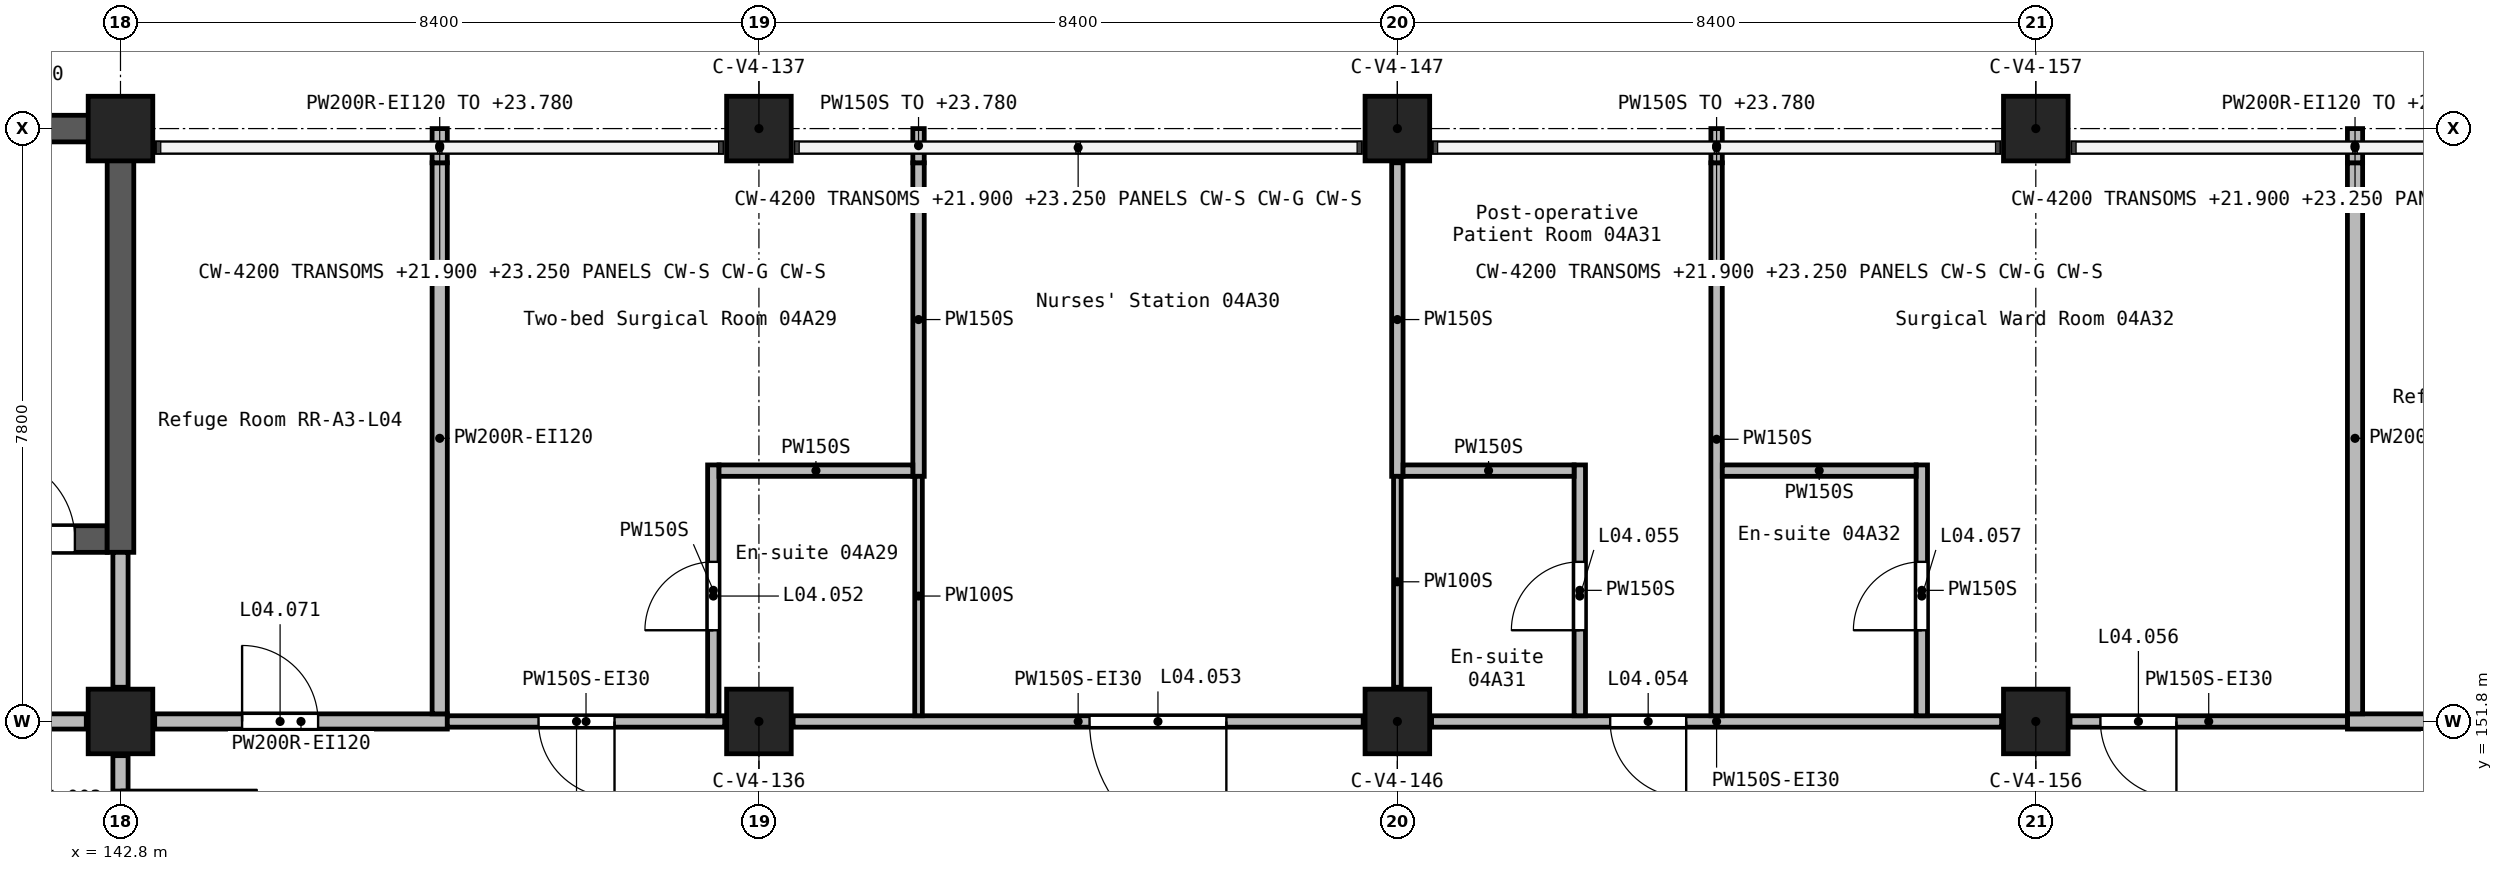
"""IFC4 building model, lengths in metres.
Left out: names, types, materials, properties, quantities, classifications, styles, units other than length and angle.
Written with IfcOpenShell. Run it as: python <this file> out.ifc"""

import sys

from ifc_helpers import new_model, si_unit, direction, frame, frame_2d, origin, origin_2d, place, context, subcontext, project, spatial, rectangle, extrude, element, fill, save


model = new_model("IFC4")
c1 = context("Model", 3, precision=1e-05, world=origin(), true_north=direction((0.0, 1.0)))
c2 = subcontext(c1, "Body", "Model", "MODEL_VIEW")
j1 = project(units=[si_unit("LENGTHUNIT", "METRE"), si_unit("PLANEANGLEUNIT", "RADIAN")], contexts=[c1])
p1 = place(None, origin())
s1 = spatial("IfcSite", under=j1, at=p1, CompositionType="ELEMENT")
p2 = place(p1, origin())
s2 = spatial("IfcBuilding", under=s1, at=p2, CompositionType="ELEMENT")
p3 = place(p2, frame((0.0, 0.0, 21.0)))
s3 = spatial("IfcBuildingStorey", under=s2, at=p3, CompositionType="ELEMENT", Elevation=21.0)
for number, where, z_axis, x_axis in (
    (1, (142.8, 151.8, 0.0), (0.0, 0.0, 1.0), (1.0, 0.0, 0.0)),
    (2, (142.8, 159.6, 0.0), (0.0, 0.0, 1.0), (1.0, 0.0, 0.0)),
    (3, (151.2, 151.8, 0.0), (0.0, 0.0, 1.0), (1.0, 0.0, 0.0)),
    (4, (151.2, 159.6, 0.0), (0.0, 0.0, 1.0), (1.0, 0.0, 0.0)),
    (5, (159.6, 151.8, 0.0), (0.0, 0.0, 1.0), (1.0, 0.0, 0.0)),
    (6, (159.6, 159.6, 0.0), (0.0, 0.0, 1.0), (1.0, 0.0, 0.0)),
    (7, (168.0, 151.8, 0.0), (0.0, 0.0, 1.0), (1.0, 0.0, 0.0)),
    (8, (168.0, 159.6, 0.0), (0.0, 0.0, 1.0), (1.0, 0.0, 0.0)),
):
    element("IfcColumn", number, at=place(p3, frame(where, z_axis=z_axis, x_axis=x_axis)), inside=s3, PredefinedType="COLUMN", context=c2, shape_type="SweptSolid", body=[
        extrude(rectangle(XDim=0.85, YDim=0.85, at=origin_2d()), origin(), (0.0, 0.0, 1.0), 3.9),
    ])
p4 = place(p3, frame((134.225, 159.6, 0.0), z_axis=(0.0, 0.0, 1.0), x_axis=(1.0, 0.0, 0.0)))
e9 = element("IfcWall", 9, at=p4, inside=s3, PredefinedType="SHEAR", context=c2, shape_type="SweptSolid", body=[
    extrude(rectangle(XDim=8.4, YDim=0.35, at=frame_2d((4.2, 0.0))), origin(), (0.0, 0.0, 1.0), 3.9),
])
p5 = place(p3, frame((134.575, 154.2, 0.0), z_axis=(0.0, 0.0, 1.0), x_axis=(1.0, 0.0, 0.0)))
e10 = element("IfcWall", 10, at=p5, inside=s3, PredefinedType="SHEAR", context=c2, shape_type="SweptSolid", body=[
    extrude(rectangle(XDim=8.05, YDim=0.35, at=frame_2d((4.025, 0.0))), origin(), (0.0, 0.0, 1.0), 3.9),
])
p6 = place(p5, frame((6.525, 0.0, 0.0)))
e11 = element("IfcOpeningElement", 11, at=p6, cuts=e10, PredefinedType="OPENING", context=c2, shape_type="SweptSolid", body=[
    extrude(rectangle(XDim=1.1, YDim=2.1, at=frame_2d((0.55, 1.05))), frame((0.0, 0.185, 0.0), z_axis=(0.0, -1.0, 0.0), x_axis=(1.0, 0.0, 0.0)), (0.0, 0.0, 1.0), 0.37),
])
p7 = place(p3, frame((142.8, 154.025, 0.0), z_axis=(0.0, 0.0, 1.0), x_axis=(0.0, 1.0, 0.0)))
e12 = element("IfcWall", 12, at=p7, inside=s3, PredefinedType="SHEAR", context=c2, shape_type="SweptSolid", body=[
    extrude(rectangle(XDim=5.75, YDim=0.35, at=frame_2d((2.875, 0.0))), origin(), (0.0, 0.0, 1.0), 3.9),
])
p8 = place(p3, frame((142.8, 154.025, 0.0), z_axis=(0.0, 0.0, 1.0), x_axis=(0.0, -1.0, 0.0)))
e13 = element("IfcWall", 13, at=p8, inside=s3, PredefinedType="SOLIDWALL", context=c2, shape_type="SweptSolid", body=[
    extrude(rectangle(XDim=1.775, YDim=0.2, at=frame_2d((0.887, 0.0))), origin(), (0.0, 0.0, 1.0), 3.6),
])
p9 = place(p3, frame((142.8, 151.35, 0.0), z_axis=(0.0, 0.0, 1.0), x_axis=(0.0, -1.0, 0.0)))
e14 = element("IfcWall", 14, at=p9, inside=s3, PredefinedType="SOLIDWALL", context=c2, shape_type="SweptSolid", body=[
    extrude(rectangle(XDim=2.7, YDim=0.2, at=frame_2d((1.35, 0.0))), origin(), (0.0, 0.0, 1.0), 3.6),
])
p10 = place(p9, frame((0.45, 0.0, 0.0)))
e15 = element("IfcOpeningElement", 15, at=p10, cuts=e14, PredefinedType="OPENING", context=c2, shape_type="SweptSolid", body=[
    extrude(rectangle(XDim=1.8, YDim=2.1, at=frame_2d((0.9, 1.05))), frame((0.0, 0.11, 0.0), z_axis=(0.0, -1.0, 0.0), x_axis=(1.0, 0.0, 0.0)), (0.0, 0.0, 1.0), 0.22),
])
p11 = place(p3, frame((172.1, 151.8, 0.0), z_axis=(0.0, 0.0, 1.0), x_axis=(1.0, 0.0, 0.0)))
e16 = element("IfcWall", 16, at=p11, inside=s3, PredefinedType="SOLIDWALL", context=c2, shape_type="SweptSolid", body=[
    extrude(rectangle(XDim=3.85, YDim=0.2, at=frame_2d((1.925, 0.0))), origin(), (0.0, 0.0, 1.0), 3.6),
])
p12 = place(p11, frame((1.7, 0.0, 0.0)))
e17 = element("IfcOpeningElement", 17, at=p12, cuts=e16, PredefinedType="OPENING", context=c2, shape_type="SweptSolid", body=[
    extrude(rectangle(XDim=1.0, YDim=2.1, at=frame_2d((0.5, 1.05))), frame((0.0, 0.11, 0.0), z_axis=(0.0, -1.0, 0.0), x_axis=(1.0, 0.0, 0.0)), (0.0, 0.0, 1.0), 0.22),
])
p13 = place(p3, frame((134.85, 151.8, 0.0), z_axis=(0.0, 0.0, 1.0), x_axis=(1.0, 0.0, 0.0)))
e18 = element("IfcWall", 18, at=p13, inside=s3, PredefinedType="SOLIDWALL", context=c2, shape_type="SweptSolid", body=[
    extrude(rectangle(XDim=7.5, YDim=0.2, at=frame_2d((3.75, 0.0))), origin(), (0.0, 0.0, 1.0), 3.6),
])
p14 = place(p13, frame((3.2, 0.0, 0.0)))
e19 = element("IfcOpeningElement", 19, at=p14, cuts=e18, PredefinedType="OPENING", context=c2, shape_type="SweptSolid", body=[
    extrude(rectangle(XDim=1.1, YDim=2.1, at=frame_2d((0.55, 1.05))), frame((0.0, 0.11, 0.0), z_axis=(0.0, -1.0, 0.0), x_axis=(1.0, 0.0, 0.0)), (0.0, 0.0, 1.0), 0.22),
])
p15 = place(p3, frame((143.25, 151.8, 0.0), z_axis=(0.0, 0.0, 1.0), x_axis=(1.0, 0.0, 0.0)))
e20 = element("IfcWall", 20, at=p15, inside=s3, PredefinedType="SOLIDWALL", context=c2, shape_type="SweptSolid", body=[
    extrude(rectangle(XDim=3.85, YDim=0.2, at=frame_2d((1.925, 0.0))), origin(), (0.0, 0.0, 1.0), 3.6),
])
p16 = place(p15, frame((1.15, 0.0, 0.0)))
e21 = element("IfcOpeningElement", 21, at=p16, cuts=e20, PredefinedType="OPENING", context=c2, shape_type="SweptSolid", body=[
    extrude(rectangle(XDim=1.0, YDim=2.1, at=frame_2d((0.5, 1.05))), frame((0.0, 0.11, 0.0), z_axis=(0.0, -1.0, 0.0), x_axis=(1.0, 0.0, 0.0)), (0.0, 0.0, 1.0), 0.22),
])
p17 = place(p3, frame((147.0, 151.9, 0.0), z_axis=(0.0, 0.0, 1.0), x_axis=(0.0, 1.0, 0.0)))
e22 = element("IfcWall", 22, at=p17, inside=s3, PredefinedType="SOLIDWALL", context=c2, shape_type="SweptSolid", body=[
    extrude(rectangle(XDim=7.25, YDim=0.2, at=frame_2d((3.625, 0.0))), origin(), (0.0, 0.0, 1.0), 3.6),
])
p18 = place(p3, frame((147.0, 159.15, 0.0), z_axis=(0.0, 0.0, 1.0), x_axis=(0.0, 1.0, 0.0)))
e23 = element("IfcWall", 23, at=p18, inside=s3, PredefinedType="SOLIDWALL", context=c2, shape_type="SweptSolid", body=[
    extrude(rectangle(XDim=0.45, YDim=0.2, at=frame_2d((0.225, 0.0))), origin(), (0.0, 0.0, 1.0), 2.78),
])
p19 = place(p3, frame((172.2, 151.9, 0.0), z_axis=(0.0, 0.0, 1.0), x_axis=(0.0, 1.0, 0.0)))
e24 = element("IfcWall", 24, at=p19, inside=s3, PredefinedType="SOLIDWALL", context=c2, shape_type="SweptSolid", body=[
    extrude(rectangle(XDim=7.25, YDim=0.2, at=frame_2d((3.625, 0.0))), origin(), (0.0, 0.0, 1.0), 3.6),
])
p20 = place(p3, frame((172.2, 159.15, 0.0), z_axis=(0.0, 0.0, 1.0), x_axis=(0.0, 1.0, 0.0)))
e25 = element("IfcWall", 25, at=p20, inside=s3, PredefinedType="SOLIDWALL", context=c2, shape_type="SweptSolid", body=[
    extrude(rectangle(XDim=0.45, YDim=0.2, at=frame_2d((0.225, 0.0))), origin(), (0.0, 0.0, 1.0), 2.78),
])
p21 = place(p3, frame((172.1, 151.8, 0.0), z_axis=(0.0, 0.0, 1.0), x_axis=(-1.0, 0.0, 0.0)))
e26 = element("IfcWall", 26, at=p21, inside=s3, PredefinedType="PARTITIONING", context=c2, shape_type="SweptSolid", body=[
    extrude(rectangle(XDim=3.65, YDim=0.15, at=frame_2d((1.825, 0.0))), origin(), (0.0, 0.0, 1.0), 3.6),
])
p22 = place(p21, frame((2.25, 0.0, 0.0)))
e27 = element("IfcOpeningElement", 27, at=p22, cuts=e26, PredefinedType="OPENING", context=c2, shape_type="SweptSolid", body=[
    extrude(rectangle(XDim=1.0, YDim=2.1, at=frame_2d((0.5, 1.05))), frame((0.0, 0.085, 0.0), z_axis=(0.0, -1.0, 0.0), x_axis=(1.0, 0.0, 0.0)), (0.0, 0.0, 1.0), 0.17),
])
p23 = place(p3, frame((167.55, 151.8, 0.0), z_axis=(0.0, 0.0, 1.0), x_axis=(-1.0, 0.0, 0.0)))
e28 = element("IfcWall", 28, at=p23, inside=s3, PredefinedType="PARTITIONING", context=c2, shape_type="SweptSolid", body=[
    extrude(rectangle(XDim=7.5, YDim=0.15, at=frame_2d((3.75, 0.0))), origin(), (0.0, 0.0, 1.0), 3.6),
])
p24 = place(p23, frame((4.15, 0.0, 0.0)))
e29 = element("IfcOpeningElement", 29, at=p24, cuts=e28, PredefinedType="OPENING", context=c2, shape_type="SweptSolid", body=[
    extrude(rectangle(XDim=1.0, YDim=2.1, at=frame_2d((0.5, 1.05))), frame((0.0, 0.085, 0.0), z_axis=(0.0, -1.0, 0.0), x_axis=(1.0, 0.0, 0.0)), (0.0, 0.0, 1.0), 0.17),
])
p25 = place(p3, frame((159.15, 151.8, 0.0), z_axis=(0.0, 0.0, 1.0), x_axis=(-1.0, 0.0, 0.0)))
e30 = element("IfcWall", 30, at=p25, inside=s3, PredefinedType="PARTITIONING", context=c2, shape_type="SweptSolid", body=[
    extrude(rectangle(XDim=7.5, YDim=0.15, at=frame_2d((3.75, 0.0))), origin(), (0.0, 0.0, 1.0), 3.6),
])
p26 = place(p25, frame((1.8, 0.0, 0.0)))
e31 = element("IfcOpeningElement", 31, at=p26, cuts=e30, PredefinedType="OPENING", context=c2, shape_type="SweptSolid", body=[
    extrude(rectangle(XDim=1.8, YDim=2.1, at=frame_2d((0.9, 1.05))), frame((0.0, 0.085, 0.0), z_axis=(0.0, -1.0, 0.0), x_axis=(1.0, 0.0, 0.0)), (0.0, 0.0, 1.0), 0.17),
])
p27 = place(p3, frame((150.75, 151.8, 0.0), z_axis=(0.0, 0.0, 1.0), x_axis=(-1.0, 0.0, 0.0)))
e32 = element("IfcWall", 32, at=p27, inside=s3, PredefinedType="PARTITIONING", context=c2, shape_type="SweptSolid", body=[
    extrude(rectangle(XDim=3.65, YDim=0.15, at=frame_2d((1.825, 0.0))), origin(), (0.0, 0.0, 1.0), 3.6),
])
p28 = place(p27, frame((1.45, 0.0, 0.0)))
e33 = element("IfcOpeningElement", 33, at=p28, cuts=e32, PredefinedType="OPENING", context=c2, shape_type="SweptSolid", body=[
    extrude(rectangle(XDim=1.0, YDim=2.1, at=frame_2d((0.5, 1.05))), frame((0.0, 0.085, 0.0), z_axis=(0.0, -1.0, 0.0), x_axis=(1.0, 0.0, 0.0)), (0.0, 0.0, 1.0), 0.17),
])
p29 = place(p3, frame((163.8, 151.875, 0.0), z_axis=(0.0, 0.0, 1.0), x_axis=(0.0, 1.0, 0.0)))
e34 = element("IfcWall", 34, at=p29, inside=s3, PredefinedType="PARTITIONING", context=c2, shape_type="SweptSolid", body=[
    extrude(rectangle(XDim=7.275, YDim=0.15, at=frame_2d((3.637, 0.0))), origin(), (0.0, 0.0, 1.0), 3.6),
])
p30 = place(p3, frame((163.8, 159.15, 0.0), z_axis=(0.0, 0.0, 1.0), x_axis=(0.0, 1.0, 0.0)))
e35 = element("IfcWall", 35, at=p30, inside=s3, PredefinedType="PARTITIONING", context=c2, shape_type="SweptSolid", body=[
    extrude(rectangle(XDim=0.45, YDim=0.15, at=frame_2d((0.225, 0.0))), origin(), (0.0, 0.0, 1.0), 2.78),
])
p31 = place(p3, frame((153.3, 155.025, 0.0), z_axis=(0.0, 0.0, 1.0), x_axis=(0.0, 1.0, 0.0)))
e36 = element("IfcWall", 36, at=p31, inside=s3, PredefinedType="PARTITIONING", context=c2, shape_type="SweptSolid", body=[
    extrude(rectangle(XDim=4.125, YDim=0.15, at=frame_2d((2.062, 0.0))), origin(), (0.0, 0.0, 1.0), 3.6),
])
p32 = place(p3, frame((153.3, 159.15, 0.0), z_axis=(0.0, 0.0, 1.0), x_axis=(0.0, 1.0, 0.0)))
e37 = element("IfcWall", 37, at=p32, inside=s3, PredefinedType="PARTITIONING", context=c2, shape_type="SweptSolid", body=[
    extrude(rectangle(XDim=0.45, YDim=0.15, at=frame_2d((0.225, 0.0))), origin(), (0.0, 0.0, 1.0), 2.78),
])
p33 = place(p3, frame((159.6, 155.025, 0.0), z_axis=(0.0, 0.0, 1.0), x_axis=(0.0, 1.0, 0.0)))
e38 = element("IfcWall", 38, at=p33, inside=s3, PredefinedType="PARTITIONING", context=c2, shape_type="SweptSolid", body=[
    extrude(rectangle(XDim=4.125, YDim=0.15, at=frame_2d((2.062, 0.0))), origin(), (0.0, 0.0, 1.0), 3.6),
])
p34 = place(p3, frame((150.6, 151.875, 0.0), z_axis=(0.0, 0.0, 1.0), x_axis=(0.0, 1.0, 0.0)))
e39 = element("IfcWall", 39, at=p34, inside=s3, PredefinedType="PARTITIONING", context=c2, shape_type="SweptSolid", body=[
    extrude(rectangle(XDim=3.3, YDim=0.15, at=frame_2d((1.65, 0.0))), origin(), (0.0, 0.0, 1.0), 3.6),
])
p35 = place(p34, frame((1.125, 0.0, 0.0)))
e40 = element("IfcOpeningElement", 40, at=p35, cuts=e39, PredefinedType="OPENING", context=c2, shape_type="SweptSolid", body=[
    extrude(rectangle(XDim=0.9, YDim=2.1, at=frame_2d((0.45, 1.05))), frame((0.0, 0.085, 0.0), z_axis=(0.0, -1.0, 0.0), x_axis=(1.0, 0.0, 0.0)), (0.0, 0.0, 1.0), 0.17),
])
p36 = place(p3, frame((162.0, 151.875, 0.0), z_axis=(0.0, 0.0, 1.0), x_axis=(0.0, 1.0, 0.0)))
e41 = element("IfcWall", 41, at=p36, inside=s3, PredefinedType="PARTITIONING", context=c2, shape_type="SweptSolid", body=[
    extrude(rectangle(XDim=3.3, YDim=0.15, at=frame_2d((1.65, 0.0))), origin(), (0.0, 0.0, 1.0), 3.6),
])
p37 = place(p36, frame((1.125, 0.0, 0.0)))
e42 = element("IfcOpeningElement", 42, at=p37, cuts=e41, PredefinedType="OPENING", context=c2, shape_type="SweptSolid", body=[
    extrude(rectangle(XDim=0.9, YDim=2.1, at=frame_2d((0.45, 1.05))), frame((0.0, 0.085, 0.0), z_axis=(0.0, -1.0, 0.0), x_axis=(1.0, 0.0, 0.0)), (0.0, 0.0, 1.0), 0.17),
])
p38 = place(p3, frame((166.5, 151.875, 0.0), z_axis=(0.0, 0.0, 1.0), x_axis=(0.0, 1.0, 0.0)))
e43 = element("IfcWall", 43, at=p38, inside=s3, PredefinedType="PARTITIONING", context=c2, shape_type="SweptSolid", body=[
    extrude(rectangle(XDim=3.3, YDim=0.15, at=frame_2d((1.65, 0.0))), origin(), (0.0, 0.0, 1.0), 3.6),
])
p39 = place(p38, frame((1.125, 0.0, 0.0)))
e44 = element("IfcOpeningElement", 44, at=p39, cuts=e43, PredefinedType="OPENING", context=c2, shape_type="SweptSolid", body=[
    extrude(rectangle(XDim=0.9, YDim=2.1, at=frame_2d((0.45, 1.05))), frame((0.0, 0.085, 0.0), z_axis=(0.0, -1.0, 0.0), x_axis=(1.0, 0.0, 0.0)), (0.0, 0.0, 1.0), 0.17),
])
for number, where, z_axis, x_axis in (
    (45, (150.675, 155.1, 0.0), (0.0, 0.0, 1.0), (1.0, 0.0, 0.0)),
    (46, (163.875, 155.1, 0.0), (0.0, 0.0, 1.0), (1.0, 0.0, 0.0)),
):
    element("IfcWall", number, at=place(p3, frame(where, z_axis=z_axis, x_axis=x_axis)), inside=s3, PredefinedType="PARTITIONING", context=c2, shape_type="SweptSolid", body=[
        extrude(rectangle(XDim=2.55, YDim=0.15, at=frame_2d((1.275, 0.0))), origin(), (0.0, 0.0, 1.0), 3.6),
    ])
p40 = place(p3, frame((159.675, 155.1, 0.0), z_axis=(0.0, 0.0, 1.0), x_axis=(1.0, 0.0, 0.0)))
e47 = element("IfcWall", 47, at=p40, inside=s3, PredefinedType="PARTITIONING", context=c2, shape_type="SweptSolid", body=[
    extrude(rectangle(XDim=2.25, YDim=0.15, at=frame_2d((1.125, 0.0))), origin(), (0.0, 0.0, 1.0), 3.6),
])
p41 = place(p3, frame((153.3, 151.875, 0.0), z_axis=(0.0, 0.0, 1.0), x_axis=(0.0, 1.0, 0.0)))
e48 = element("IfcWall", 48, at=p41, inside=s3, PredefinedType="PARTITIONING", context=c2, shape_type="SweptSolid", body=[
    extrude(rectangle(XDim=3.15, YDim=0.1, at=frame_2d((1.575, 0.0))), origin(), (0.0, 0.0, 1.0), 3.6),
])
p42 = place(p3, frame((159.6, 152.25, 0.0), z_axis=(0.0, 0.0, 1.0), x_axis=(0.0, 1.0, 0.0)))
e49 = element("IfcWall", 49, at=p42, inside=s3, PredefinedType="PARTITIONING", context=c2, shape_type="SweptSolid", body=[
    extrude(rectangle(XDim=2.775, YDim=0.1, at=frame_2d((1.387, 0.0))), origin(), (0.0, 0.0, 1.0), 3.6),
])
p43 = place(p10, origin())
e50 = element("IfcDoor", 50, at=p43, inside=s3, OperationType="DOUBLE_DOOR_SINGLE_SWING", PredefinedType="DOOR", context=c2, shape_type="SweptSolid", body=[
    extrude(rectangle(XDim=1.8, YDim=2.1, at=frame_2d((0.9, 1.05))), frame((0.0, 0.025, 0.0), z_axis=(0.0, -1.0, 0.0), x_axis=(1.0, 0.0, 0.0)), (0.0, 0.0, 1.0), 0.05),
])
fill(e15, e50)
p44 = place(p28, frame((1.0, 0.0, 0.0), z_axis=(0.0, 0.0, 1.0), x_axis=(-1.0, 0.0, 0.0)))
e51 = element("IfcDoor", 51, at=p44, inside=s3, OperationType="SINGLE_SWING_LEFT", PredefinedType="DOOR", context=c2, shape_type="SweptSolid", body=[
    extrude(rectangle(XDim=1.0, YDim=2.1, at=frame_2d((0.5, 1.05))), frame((0.0, 0.025, 0.0), z_axis=(0.0, -1.0, 0.0), x_axis=(1.0, 0.0, 0.0)), (0.0, 0.0, 1.0), 0.05),
])
fill(e33, e51)
p45 = place(p35, frame((0.9, 0.0, 0.0), z_axis=(0.0, 0.0, 1.0), x_axis=(-1.0, 0.0, 0.0)))
e52 = element("IfcDoor", 52, at=p45, inside=s3, OperationType="SINGLE_SWING_RIGHT", PredefinedType="DOOR", context=c2, shape_type="SweptSolid", body=[
    extrude(rectangle(XDim=0.9, YDim=2.1, at=frame_2d((0.45, 1.05))), frame((0.0, 0.025, 0.0), z_axis=(0.0, -1.0, 0.0), x_axis=(1.0, 0.0, 0.0)), (0.0, 0.0, 1.0), 0.05),
])
fill(e40, e52)
p46 = place(p26, frame((1.8, 0.0, 0.0), z_axis=(0.0, 0.0, 1.0), x_axis=(-1.0, 0.0, 0.0)))
e53 = element("IfcDoor", 53, at=p46, inside=s3, OperationType="DOUBLE_DOOR_SINGLE_SWING", PredefinedType="DOOR", context=c2, shape_type="SweptSolid", body=[
    extrude(rectangle(XDim=1.8, YDim=2.1, at=frame_2d((0.9, 1.05))), frame((0.0, 0.025, 0.0), z_axis=(0.0, -1.0, 0.0), x_axis=(1.0, 0.0, 0.0)), (0.0, 0.0, 1.0), 0.05),
])
fill(e31, e53)
p47 = place(p24, frame((1.0, 0.0, 0.0), z_axis=(0.0, 0.0, 1.0), x_axis=(-1.0, 0.0, 0.0)))
e54 = element("IfcDoor", 54, at=p47, inside=s3, OperationType="SINGLE_SWING_LEFT", PredefinedType="DOOR", context=c2, shape_type="SweptSolid", body=[
    extrude(rectangle(XDim=1.0, YDim=2.1, at=frame_2d((0.5, 1.05))), frame((0.0, 0.025, 0.0), z_axis=(0.0, -1.0, 0.0), x_axis=(1.0, 0.0, 0.0)), (0.0, 0.0, 1.0), 0.05),
])
fill(e29, e54)
p48 = place(p37, origin())
e55 = element("IfcDoor", 55, at=p48, inside=s3, OperationType="SINGLE_SWING_LEFT", PredefinedType="DOOR", context=c2, shape_type="SweptSolid", body=[
    extrude(rectangle(XDim=0.9, YDim=2.1, at=frame_2d((0.45, 1.05))), frame((0.0, 0.025, 0.0), z_axis=(0.0, -1.0, 0.0), x_axis=(1.0, 0.0, 0.0)), (0.0, 0.0, 1.0), 0.05),
])
fill(e42, e55)
p49 = place(p22, frame((1.0, 0.0, 0.0), z_axis=(0.0, 0.0, 1.0), x_axis=(-1.0, 0.0, 0.0)))
e56 = element("IfcDoor", 56, at=p49, inside=s3, OperationType="SINGLE_SWING_LEFT", PredefinedType="DOOR", context=c2, shape_type="SweptSolid", body=[
    extrude(rectangle(XDim=1.0, YDim=2.1, at=frame_2d((0.5, 1.05))), frame((0.0, 0.025, 0.0), z_axis=(0.0, -1.0, 0.0), x_axis=(1.0, 0.0, 0.0)), (0.0, 0.0, 1.0), 0.05),
])
fill(e27, e56)
p50 = place(p39, origin())
e57 = element("IfcDoor", 57, at=p50, inside=s3, OperationType="SINGLE_SWING_LEFT", PredefinedType="DOOR", context=c2, shape_type="SweptSolid", body=[
    extrude(rectangle(XDim=0.9, YDim=2.1, at=frame_2d((0.45, 1.05))), frame((0.0, 0.025, 0.0), z_axis=(0.0, -1.0, 0.0), x_axis=(1.0, 0.0, 0.0)), (0.0, 0.0, 1.0), 0.05),
])
fill(e44, e57)
p51 = place(p16, origin())
e58 = element("IfcDoor", 58, at=p51, inside=s3, OperationType="SINGLE_SWING_LEFT", PredefinedType="DOOR", context=c2, shape_type="SweptSolid", body=[
    extrude(rectangle(XDim=1.0, YDim=2.1, at=frame_2d((0.5, 1.05))), frame((0.0, 0.025, 0.0), z_axis=(0.0, -1.0, 0.0), x_axis=(1.0, 0.0, 0.0)), (0.0, 0.0, 1.0), 0.05),
])
fill(e21, e58)
p52 = place(p6, origin())
e59 = element("IfcDoor", 59, at=p52, inside=s3, OperationType="SINGLE_SWING_RIGHT", PredefinedType="DOOR", context=c2, shape_type="SweptSolid", body=[
    extrude(rectangle(XDim=1.1, YDim=2.1, at=frame_2d((0.55, 1.05))), frame((0.0, 0.025, 0.0), z_axis=(0.0, -1.0, 0.0), x_axis=(1.0, 0.0, 0.0)), (0.0, 0.0, 1.0), 0.05),
])
fill(e11, e59)
save(model, sys.argv[1])
